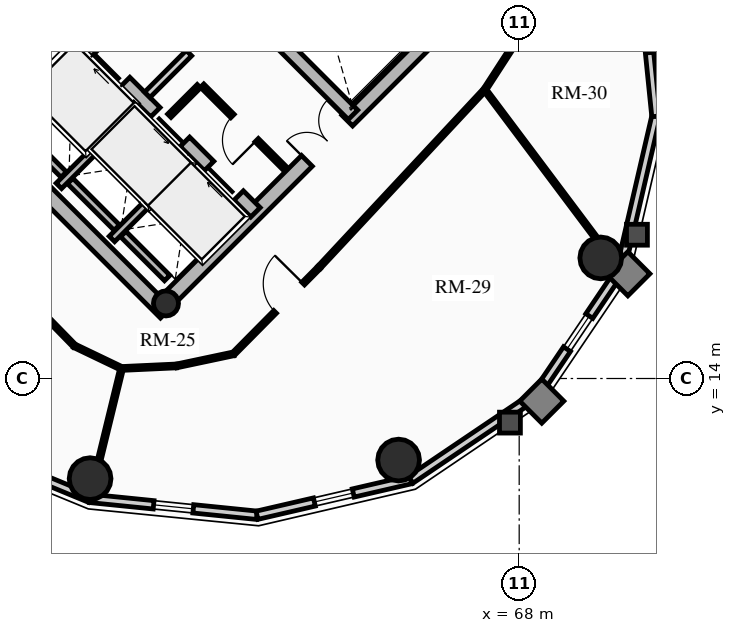
"""IFC4 building model, lengths in metres.
Left out: names, types, materials, properties, quantities, classifications, styles, units other than length and angle.
Written with IfcOpenShell. Run it as: python <this file> out.ifc"""

import sys

from ifc_helpers import new_model, si_unit, direction, frame, frame_2d, origin, origin_2d, place, context, subcontext, project, spatial, rectangle, circle, hollow_circle, extrude, source, transform, mapped, element, fill, save


model = new_model("IFC4")
c1 = context("Model", 3, precision=1e-05, world=origin(), true_north=direction((0.0, 1.0)))
c2 = subcontext(c1, "Body", "Model", "MODEL_VIEW")
j1 = project(units=[si_unit("LENGTHUNIT", "METRE"), si_unit("PLANEANGLEUNIT", "RADIAN")], contexts=[c1])
p1 = place(None, origin())
s1 = spatial("IfcSite", under=j1, at=p1, CompositionType="ELEMENT")
p2 = place(p1, origin())
s2 = spatial("IfcBuilding", under=s1, at=p2, CompositionType="ELEMENT")
p3 = place(p2, frame((0.0, 0.0, 202.48)))
s3 = spatial("IfcBuildingStorey", under=s2, at=p3, CompositionType="ELEMENT", Elevation=202.48)
p4 = place(p3, frame((58.702, 15.732, 0.0), z_axis=(0.0, 0.0, 1.0), x_axis=(-0.707106781187, 0.707106781187, 0.0)))
e1 = element("IfcWall", 1, at=p4, inside=s3, PredefinedType="SHEAR", context=c2, shape_type="SweptSolid", body=[
    extrude(rectangle(XDim=14.1, YDim=0.4, at=frame_2d((7.05, 0.0))), origin(), (0.0, 0.0, 1.0), 2.91),
])
p5 = place(p3, frame((58.561, 15.873, 0.0), z_axis=(0.0, 0.0, 1.0), x_axis=(0.707106781187, 0.707106781187, 0.0)))
e2 = element("IfcWall", 2, at=p5, inside=s3, PredefinedType="SHEAR", context=c2, shape_type="SweptSolid", body=[
    extrude(rectangle(XDim=10.7, YDim=0.4, at=frame_2d((5.35, 0.0))), origin(), (0.0, 0.0, 1.0), 2.91),
])
m1 = source(origin(), c2, "Body", "SweptSolid", [
    extrude(rectangle(XDim=1.5, YDim=2.02, at=frame_2d((0.75, 1.01))), frame((0.0, 0.21, 0.0), z_axis=(0.0, -1.0, 0.0), x_axis=(1.0, 0.0, 0.0)), (0.0, 0.0, 1.0), 0.42),
])
p6 = place(p5, frame((5.45, 0.0, 0.0)))
e3 = element("IfcOpeningElement", 3, at=p6, cuts=e2, PredefinedType="OPENING", context=c2, shape_type="MappedRepresentation", body=[
    mapped(m1, transform((0.0, 0.0, 0.0), x_axis=(1.0, 0.0, 0.0), y_axis=(0.0, 1.0, 0.0), z_axis=(0.0, 0.0, 1.0), scale=1.0)),
])
p7 = place(p3, frame((61.06, 18.373, 0.0), z_axis=(0.0, 0.0, 1.0), x_axis=(-0.707106781187, 0.707106781187, 0.0)))
e4 = element("IfcWall", 4, at=p7, inside=s3, PredefinedType="SHEAR", context=c2, shape_type="SweptSolid", body=[
    extrude(rectangle(XDim=13.7, YDim=0.35, at=frame_2d((6.85, 0.0))), origin(), (0.0, 0.0, 1.0), 2.91),
])
m2 = source(origin(), c2, "Body", "SweptSolid", [
    extrude(rectangle(XDim=1.1, YDim=2.015, at=frame_2d((0.55, 1.007))), frame((0.0, 0.185, 0.0), z_axis=(0.0, -1.0, 0.0), x_axis=(1.0, 0.0, 0.0)), (0.0, 0.0, 1.0), 0.37),
])
p8 = place(p7, frame((4.85, 0.0, 0.0)))
e5 = element("IfcOpeningElement", 5, at=p8, cuts=e4, PredefinedType="OPENING", context=c2, shape_type="MappedRepresentation", body=[
    mapped(m2, transform((0.0, 0.0, 0.0), x_axis=(1.0, 0.0, 0.0), y_axis=(0.0, 1.0, 0.0), z_axis=(0.0, 0.0, 1.0), scale=1.0)),
])
p9 = place(p7, frame((0.625, 0.0, 0.0)))
e6 = element("IfcOpeningElement", 6, at=p9, cuts=e4, PredefinedType="OPENING", context=c2, shape_type="MappedRepresentation", body=[
    mapped(m2, transform((0.0, 0.0, 0.0), x_axis=(1.0, 0.0, 0.0), y_axis=(0.0, 1.0, 0.0), z_axis=(0.0, 0.0, 1.0), scale=1.0)),
])
p10 = place(p7, frame((2.625, 0.0, 0.0)))
e7 = element("IfcOpeningElement", 7, at=p10, cuts=e4, PredefinedType="OPENING", context=c2, shape_type="MappedRepresentation", body=[
    mapped(m2, transform((0.0, 0.0, 0.0), x_axis=(1.0, 0.0, 0.0), y_axis=(0.0, 1.0, 0.0), z_axis=(0.0, 0.0, 1.0), scale=1.0)),
])
m3 = source(origin(), c2, "Body", "SweptSolid", [
    extrude(rectangle(XDim=1.15, YDim=2.02, at=frame_2d((0.575, 1.01))), frame((0.0, 0.185, 0.0), z_axis=(0.0, -1.0, 0.0), x_axis=(1.0, 0.0, 0.0)), (0.0, 0.0, 1.0), 0.37),
])
p11 = place(p7, frame((7.27, 0.0, 0.0)))
e8 = element("IfcOpeningElement", 8, at=p11, cuts=e4, PredefinedType="OPENING", context=c2, shape_type="MappedRepresentation", body=[
    mapped(m3, transform((0.0, 0.0, 0.0), x_axis=(1.0, 0.0, 0.0), y_axis=(0.0, 1.0, 0.0), z_axis=(0.0, 0.0, 1.0), scale=1.0)),
])
p12 = place(p3, frame((63.627, 20.94, 0.0), z_axis=(0.0, 0.0, 1.0), x_axis=(-0.707119496762, 0.707094065383, 0.0)))
e9 = element("IfcWall", 9, at=p12, inside=s3, PredefinedType="SHEAR", context=c2, shape_type="SweptSolid", body=[
    extrude(rectangle(XDim=9.6, YDim=0.35, at=frame_2d((4.8, 0.0))), origin(), (0.0, 0.0, 1.0), 2.91),
])
p13 = place(p12, frame((5.28, 0.0, 0.0)))
e10 = element("IfcOpeningElement", 10, at=p13, cuts=e9, PredefinedType="OPENING", context=c2, shape_type="MappedRepresentation", body=[
    mapped(m3, transform((0.0, 0.0, 0.0), x_axis=(1.0, 0.0, 0.0), y_axis=(0.0, 1.0, 0.0), z_axis=(0.0, 0.0, 1.0), scale=1.0)),
])
p14 = place(p3, frame((53.784, 21.003, 0.0), z_axis=(0.0, 0.0, 1.0), x_axis=(0.707106781187, 0.707106781187, 0.0)))
e11 = element("IfcWall", 11, at=p14, inside=s3, PredefinedType="SHEAR", context=c2, shape_type="SweptSolid", body=[
    extrude(rectangle(XDim=3.285, YDim=0.35, at=frame_2d((1.643, 0.0))), origin(), (0.0, 0.0, 1.0), 2.91),
])
p15 = place(p3, frame((58.706, 15.976, 0.0), z_axis=(0.0, 0.0, 1.0), x_axis=(0.707106781187, 0.707106781187, 0.0)))
e12 = element("IfcColumn", 12, at=p15, inside=s3, PredefinedType="COLUMN", context=c2, shape_type="SweptSolid", body=[
    extrude(hollow_circle(Radius=0.33, WallThickness=0.025, at=origin_2d()), origin(), (0.0, 0.0, 1.0), 2.91),
])
for number, where, z_axis, x_axis in (
    (13, (56.709, 11.365, 0.0), (0.0, 0.0, 1.0), (1.0, 0.0, 0.0)),
    (14, (64.827, 11.854, 0.0), (0.0, 0.0, 1.0), (1.0, 0.0, 0.0)),
    (15, (70.146, 17.173, 0.0), (0.0, 0.0, 1.0), (1.0, 0.0, 0.0)),
):
    element("IfcColumn", number, at=place(p3, frame(where, z_axis=z_axis, x_axis=x_axis)), inside=s3, PredefinedType="USERDEFINED", context=c2, shape_type="SweptSolid", body=[
        extrude(circle(Radius=0.55, at=origin_2d()), origin(), (0.0, 0.0, 1.0), 2.91),
    ])
p16 = place(p3, frame((56.705, 10.845, 0.0), z_axis=(0.0, 0.0, 1.0), x_axis=(-0.924447353237, 0.381309704956, 0.0)))
e16 = element("IfcWall", 16, at=p16, inside=s3, PredefinedType="SOLIDWALL", context=c2, shape_type="SweptSolid", body=[
    extrude(rectangle(XDim=4.671, YDim=0.22, at=frame_2d((2.335, 0.0))), origin(), (0.0, 0.0, 1.0), 2.322),
])
p17 = place(p3, frame((61.1, 10.401, 0.0), z_axis=(0.0, 0.0, 1.0), x_axis=(-0.994929930991, 0.100570534541, 0.0)))
e17 = element("IfcWall", 17, at=p17, inside=s3, PredefinedType="SOLIDWALL", context=c2, shape_type="SweptSolid", body=[
    extrude(rectangle(XDim=4.418, YDim=0.22, at=frame_2d((2.209, 0.0))), origin(), (0.0, 0.0, 1.0), 2.322),
])
m4 = source(origin(), c2, "Body", "SweptSolid", [
    extrude(rectangle(XDim=1.05, YDim=1.3, at=frame_2d((0.525, 0.65))), frame((0.0, 0.12, 0.0), z_axis=(0.0, -1.0, 0.0), x_axis=(1.0, 0.0, 0.0)), (0.0, 0.0, 1.0), 0.24),
])
p18 = place(p17, frame((1.684, 0.0, 0.65)))
e18 = element("IfcOpeningElement", 18, at=p18, cuts=e17, PredefinedType="OPENING", context=c2, shape_type="MappedRepresentation", body=[
    mapped(m4, transform((0.0, 0.0, 0.0), x_axis=(1.0, 0.0, 0.0), y_axis=(0.0, 1.0, 0.0), z_axis=(0.0, 0.0, 1.0), scale=1.0)),
])
p19 = place(p3, frame((65.144, 11.337, 0.0), z_axis=(0.0, 0.0, 1.0), x_axis=(-0.974249228678, -0.225473813158, 0.0)))
e19 = element("IfcWall", 19, at=p19, inside=s3, PredefinedType="SOLIDWALL", context=c2, shape_type="SweptSolid", body=[
    extrude(rectangle(XDim=4.15, YDim=0.22, at=frame_2d((2.075, 0.0))), origin(), (0.0, 0.0, 1.0), 2.322),
])
p20 = place(p19, frame((1.55, 0.0, 0.65)))
e20 = element("IfcOpeningElement", 20, at=p20, cuts=e19, PredefinedType="OPENING", context=c2, shape_type="MappedRepresentation", body=[
    mapped(m4, transform((0.0, 0.0, 0.0), x_axis=(1.0, 0.0, 0.0), y_axis=(0.0, 1.0, 0.0), z_axis=(0.0, 0.0, 1.0), scale=1.0)),
])
p21 = place(p3, frame((68.439, 13.561, 0.0), z_axis=(0.0, 0.0, 1.0), x_axis=(-0.828833723692, -0.559495003079, 0.0)))
e21 = element("IfcWall", 21, at=p21, inside=s3, PredefinedType="SOLIDWALL", context=c2, shape_type="SweptSolid", body=[
    extrude(rectangle(XDim=3.976, YDim=0.22, at=frame_2d((1.988, 0.0))), origin(), (0.0, 0.0, 1.0), 2.322),
])
p22 = place(p3, frame((70.663, 16.856, 0.0), z_axis=(0.0, 0.0, 1.0), x_axis=(-0.559495003079, -0.828833723692, 0.0)))
e22 = element("IfcWall", 22, at=p22, inside=s3, PredefinedType="SOLIDWALL", context=c2, shape_type="SweptSolid", body=[
    extrude(rectangle(XDim=3.976, YDim=0.22, at=frame_2d((1.988, 0.0))), origin(), (0.0, 0.0, 1.0), 2.322),
])
p23 = place(p22, frame((1.463, 0.0, 0.65)))
e23 = element("IfcOpeningElement", 23, at=p23, cuts=e22, PredefinedType="OPENING", context=c2, shape_type="MappedRepresentation", body=[
    mapped(m4, transform((0.0, 0.0, 0.0), x_axis=(1.0, 0.0, 0.0), y_axis=(0.0, 1.0, 0.0), z_axis=(0.0, 0.0, 1.0), scale=1.0)),
])
p24 = place(p3, frame((71.599, 20.9, 0.0), z_axis=(0.0, 0.0, 1.0), x_axis=(-0.225473813158, -0.974249228678, 0.0)))
e24 = element("IfcWall", 24, at=p24, inside=s3, PredefinedType="SOLIDWALL", context=c2, shape_type="SweptSolid", body=[
    extrude(rectangle(XDim=4.15, YDim=0.22, at=frame_2d((2.075, 0.0))), origin(), (0.0, 0.0, 1.0), 2.322),
])
p25 = place(p3, frame((71.155, 25.295, 0.0), z_axis=(0.0, 0.0, 1.0), x_axis=(0.100570534541, -0.994929930991, 0.0)))
e25 = element("IfcWall", 25, at=p25, inside=s3, PredefinedType="SOLIDWALL", context=c2, shape_type="SweptSolid", body=[
    extrude(rectangle(XDim=4.418, YDim=0.22, at=frame_2d((2.209, 0.0))), origin(), (0.0, 0.0, 1.0), 2.322),
])
p26 = place(p25, frame((1.684, 0.0, 0.65)))
e26 = element("IfcOpeningElement", 26, at=p26, cuts=e25, PredefinedType="OPENING", context=c2, shape_type="MappedRepresentation", body=[
    mapped(m4, transform((0.0, 0.0, 0.0), x_axis=(1.0, 0.0, 0.0), y_axis=(0.0, 1.0, 0.0), z_axis=(0.0, 0.0, 1.0), scale=1.0)),
])
p27 = place(p3, frame((55.888, 19.069, 0.0), z_axis=(0.0, 0.0, 1.0), x_axis=(0.707106781187, 0.707106781187, 0.0)))
e27 = element("IfcWall", 27, at=p27, inside=s3, PredefinedType="SHEAR", context=c2, shape_type="SweptSolid", body=[
    extrude(rectangle(XDim=2.97, YDim=0.2, at=frame_2d((1.485, 0.0))), origin(), (0.0, 0.0, 1.0), 2.91),
])
p28 = place(p3, frame((56.015, 19.366, 0.0), z_axis=(0.0, 0.0, 1.0), x_axis=(-0.707106781187, 0.707106781187, 0.0)))
e28 = element("IfcWall", 28, at=p28, inside=s3, PredefinedType="SHEAR", context=c2, shape_type="SweptSolid", body=[
    extrude(rectangle(XDim=2.44, YDim=0.2, at=frame_2d((1.22, 0.0))), origin(), (0.0, 0.0, 1.0), 2.91),
])
p29 = place(p3, frame((57.284, 17.673, 0.0), z_axis=(0.0, 0.0, 1.0), x_axis=(0.707147878904, 0.70706568108, 0.0)))
e29 = element("IfcWall", 29, at=p29, inside=s3, PredefinedType="SHEAR", context=c2, shape_type="SweptSolid", body=[
    extrude(rectangle(XDim=2.97, YDim=0.2, at=frame_2d((1.485, 0.0))), origin(), (0.0, 0.0, 1.0), 2.91),
])
p30 = place(p3, frame((57.412, 17.97, 0.0), z_axis=(0.0, 0.0, 1.0), x_axis=(-0.707106781187, 0.707106781187, 0.0)))
e30 = element("IfcWall", 30, at=p30, inside=s3, PredefinedType="SHEAR", context=c2, shape_type="SweptSolid", body=[
    extrude(rectangle(XDim=1.735, YDim=0.2, at=frame_2d((0.867, 0.0))), origin(), (0.0, 0.0, 1.0), 2.91),
])
p31 = place(p3, frame((58.737, 16.644, 0.0), z_axis=(0.0, 0.0, 1.0), x_axis=(-0.707032117043, 0.707181437447, 0.0)))
e31 = element("IfcWall", 31, at=p31, inside=s3, PredefinedType="SHEAR", context=c2, shape_type="SweptSolid", body=[
    extrude(rectangle(XDim=1.635, YDim=0.2, at=frame_2d((0.817, 0.0))), origin(), (0.0, 0.0, 1.0), 2.91),
])
p32 = place(p3, frame((58.214, 21.467, 0.0), z_axis=(0.0, 0.0, 1.0), x_axis=(0.707106781187, 0.707106781187, 0.0)))
e32 = element("IfcWall", 32, at=p32, inside=s3, PredefinedType="PARTITIONING", context=c2, shape_type="SweptSolid", body=[
    extrude(rectangle(XDim=3.28, YDim=0.2, at=frame_2d((1.64, 0.0))), origin(), (0.0, 0.0, 1.0), 2.685),
])
m5 = source(origin(), c2, "Body", "SweptSolid", [
    extrude(rectangle(XDim=1.5, YDim=2.02, at=frame_2d((0.75, 1.01))), frame((0.0, 0.11, 0.0), z_axis=(0.0, -1.0, 0.0), x_axis=(1.0, 0.0, 0.0)), (0.0, 0.0, 1.0), 0.22),
])
p33 = place(p32, frame((1.55, 0.0, 0.0)))
e33 = element("IfcOpeningElement", 33, at=p33, cuts=e32, PredefinedType="OPENING", context=c2, shape_type="MappedRepresentation", body=[
    mapped(m5, transform((0.0, 0.0, 0.0), x_axis=(1.0, 0.0, 0.0), y_axis=(0.0, 1.0, 0.0), z_axis=(0.0, 0.0, 1.0), scale=1.0)),
])
p34 = place(p3, frame((61.835, 19.529, 0.0), z_axis=(0.0, 0.0, 1.0), x_axis=(-0.707146413884, 0.707067146267, 0.0)))
e34 = element("IfcWall", 34, at=p34, inside=s3, PredefinedType="PARTITIONING", context=c2, shape_type="SweptSolid", body=[
    extrude(rectangle(XDim=3.08, YDim=0.125, at=frame_2d((1.54, 0.0))), origin(), (0.0, 0.0, 1.0), 2.685),
])
m6 = source(origin(), c2, "Body", "SweptSolid", [
    extrude(rectangle(XDim=0.9, YDim=2.005, at=frame_2d((0.45, 1.002))), frame((0.0, 0.073, 0.0), z_axis=(0.0, -1.0, 0.0), x_axis=(1.0, 0.0, 0.0)), (0.0, 0.0, 1.0), 0.145),
])
p35 = place(p34, frame((1.05, 0.0, 0.0)))
e35 = element("IfcOpeningElement", 35, at=p35, cuts=e34, PredefinedType="OPENING", context=c2, shape_type="MappedRepresentation", body=[
    mapped(m6, transform((0.0, 0.0, 0.0), x_axis=(1.0, 0.0, 0.0), y_axis=(0.0, 1.0, 0.0), z_axis=(0.0, 0.0, 1.0), scale=1.0)),
])
p36 = place(p3, frame((58.794, 20.915, 0.0), z_axis=(0.0, 0.0, 1.0), x_axis=(0.707106781187, 0.707106781187, 0.0)))
e36 = element("IfcWall", 36, at=p36, inside=s3, PredefinedType="PARTITIONING", context=c2, shape_type="SweptSolid", body=[
    extrude(rectangle(XDim=1.1, YDim=0.125, at=frame_2d((0.55, 0.0))), origin(), (0.0, 0.0, 1.0), 2.685),
])
p37 = place(p3, frame((52.126, 19.126, 0.0), z_axis=(0.0, 0.0, 1.0), x_axis=(0.698979087027, -0.715142108884, 0.0)))
e37 = element("IfcWall", 37, at=p37, inside=s3, PredefinedType="MOVABLE", context=c2, shape_type="SweptSolid", body=[
    extrude(rectangle(XDim=5.966, YDim=0.1, at=frame_2d((2.983, 0.0))), origin(), (0.0, 0.0, 1.0), 2.322),
])
p38 = place(p3, frame((56.296, 14.859, 0.0), z_axis=(0.0, 0.0, 1.0), x_axis=(0.90178292445, -0.432189260823, 0.0)))
e38 = element("IfcWall", 38, at=p38, inside=s3, PredefinedType="MOVABLE", context=c2, shape_type="SweptSolid", body=[
    extrude(rectangle(XDim=1.377, YDim=0.1, at=frame_2d((0.688, 0.0))), origin(), (0.0, 0.0, 1.0), 2.255),
])
p39 = place(p3, frame((57.538, 14.264, 0.0), z_axis=(0.0, 0.0, 1.0), x_axis=(0.99892990172, 0.046249880546, 0.0)))
e39 = element("IfcWall", 39, at=p39, inside=s3, PredefinedType="MOVABLE", context=c2, shape_type="SweptSolid", body=[
    extrude(rectangle(XDim=1.446, YDim=0.1, at=frame_2d((0.723, 0.0))), origin(), (0.0, 0.0, 1.0), 2.322),
])
p40 = place(p3, frame((58.983, 14.331, 0.0), z_axis=(0.0, 0.0, 1.0), x_axis=(0.978328007546, 0.207061125397, 0.0)))
e40 = element("IfcWall", 40, at=p40, inside=s3, PredefinedType="MOVABLE", context=c2, shape_type="SweptSolid", body=[
    extrude(rectangle(XDim=1.534, YDim=0.1, at=frame_2d((0.767, 0.0))), origin(), (0.0, 0.0, 1.0), 2.255),
])
p41 = place(p3, frame((60.484, 14.648, 0.0), z_axis=(0.0, 0.0, 1.0), x_axis=(0.703398221944, 0.710795991383, 0.0)))
e41 = element("IfcWall", 41, at=p41, inside=s3, PredefinedType="MOVABLE", context=c2, shape_type="SweptSolid", body=[
    extrude(rectangle(XDim=3.201, YDim=0.1, at=frame_2d((1.601, 0.0))), origin(), (0.0, 0.0, 1.0), 2.322),
])
m7 = source(origin(), c2, "Body", "SweptSolid", [
    extrude(rectangle(XDim=1.05, YDim=2.015, at=frame_2d((0.525, 1.007))), frame((0.0, 0.06, 0.0), z_axis=(0.0, -1.0, 0.0), x_axis=(1.0, 0.0, 0.0)), (0.0, 0.0, 1.0), 0.12),
])
p42 = place(p41, frame((1.553, 0.0, 0.0)))
e42 = element("IfcOpeningElement", 42, at=p42, cuts=e41, PredefinedType="OPENING", context=c2, shape_type="MappedRepresentation", body=[
    mapped(m7, transform((0.0, 0.0, 0.0), x_axis=(1.0, 0.0, 0.0), y_axis=(0.0, 1.0, 0.0), z_axis=(0.0, 0.0, 1.0), scale=1.0)),
])
p43 = place(p3, frame((62.736, 16.924, 0.0), z_axis=(0.0, 0.0, 1.0), x_axis=(0.681946700833, 0.731401871219, 0.0)))
e43 = element("IfcWall", 43, at=p43, inside=s3, PredefinedType="MOVABLE", context=c2, shape_type="SweptSolid", body=[
    extrude(rectangle(XDim=6.393, YDim=0.1, at=frame_2d((3.196, 0.0))), origin(), (0.0, 0.0, 1.0), 2.255),
])
p44 = place(p3, frame((67.095, 21.6, 0.0), z_axis=(0.0, 0.0, 1.0), x_axis=(0.543773190184, 0.839232219137, 0.0)))
e44 = element("IfcWall", 44, at=p44, inside=s3, PredefinedType="MOVABLE", context=c2, shape_type="SweptSolid", body=[
    extrude(rectangle(XDim=1.823, YDim=0.1, at=frame_2d((0.911, 0.0))), origin(), (0.0, 0.0, 1.0), 2.255),
])
p45 = place(p3, frame((57.538, 14.264, 0.0), z_axis=(0.0, 0.0, 1.0), x_axis=(-0.237377006249, -0.971417601706, 0.0)))
e45 = element("IfcWall", 45, at=p45, inside=s3, PredefinedType="MOVABLE", context=c2, shape_type="SweptSolid", body=[
    extrude(rectangle(XDim=3.499, YDim=0.1, at=frame_2d((1.75, 0.0))), origin(), (0.0, 0.0, 1.0), 2.322),
])
p46 = place(p3, frame((67.095, 21.6, 0.0), z_axis=(0.0, 0.0, 1.0), x_axis=(0.599947190798, -0.800039604178, 0.0)))
e46 = element("IfcWall", 46, at=p46, inside=s3, PredefinedType="MOVABLE", context=c2, shape_type="SweptSolid", body=[
    extrude(rectangle(XDim=5.918, YDim=0.1, at=frame_2d((2.959, 0.0))), origin(), (0.0, 0.0, 1.0), 2.322),
])
m8 = source(origin(), c2, "Body", "SweptSolid", [
    extrude(rectangle(XDim=1.05, YDim=1.3, at=frame_2d((0.525, 0.65))), frame((0.0, 0.03, 0.0), z_axis=(0.0, -1.0, 0.0), x_axis=(1.0, 0.0, 0.0)), (0.0, 0.0, 1.0), 0.06),
])
p47 = place(p18, origin())
e47 = element("IfcWindow", 47, at=p47, inside=s3, PartitioningType="SINGLE_PANEL", PredefinedType="WINDOW", context=c2, shape_type="MappedRepresentation", body=[
    mapped(m8, transform((0.0, 0.0, 0.0), x_axis=(1.0, 0.0, 0.0), y_axis=(0.0, 1.0, 0.0), z_axis=(0.0, 0.0, 1.0), scale=1.0)),
])
fill(e18, e47)
p48 = place(p20, origin())
e48 = element("IfcWindow", 48, at=p48, inside=s3, PartitioningType="SINGLE_PANEL", PredefinedType="WINDOW", context=c2, shape_type="MappedRepresentation", body=[
    mapped(m8, transform((0.0, 0.0, 0.0), x_axis=(1.0, 0.0, 0.0), y_axis=(0.0, 1.0, 0.0), z_axis=(0.0, 0.0, 1.0), scale=1.0)),
])
fill(e20, e48)
p49 = place(p23, origin())
e49 = element("IfcWindow", 49, at=p49, inside=s3, PartitioningType="SINGLE_PANEL", PredefinedType="WINDOW", context=c2, shape_type="MappedRepresentation", body=[
    mapped(m8, transform((0.0, 0.0, 0.0), x_axis=(1.0, 0.0, 0.0), y_axis=(0.0, 1.0, 0.0), z_axis=(0.0, 0.0, 1.0), scale=1.0)),
])
fill(e23, e49)
p50 = place(p26, origin())
e50 = element("IfcWindow", 50, at=p50, inside=s3, PartitioningType="SINGLE_PANEL", PredefinedType="WINDOW", context=c2, shape_type="MappedRepresentation", body=[
    mapped(m8, transform((0.0, 0.0, 0.0), x_axis=(1.0, 0.0, 0.0), y_axis=(0.0, 1.0, 0.0), z_axis=(0.0, 0.0, 1.0), scale=1.0)),
])
fill(e26, e50)
m9 = source(origin(), c2, "Body", "SweptSolid", [
    extrude(rectangle(XDim=1.1, YDim=2.015, at=frame_2d((0.55, 1.007))), frame((0.0, 0.025, 0.0), z_axis=(0.0, -1.0, 0.0), x_axis=(1.0, 0.0, 0.0)), (0.0, 0.0, 1.0), 0.05),
])
p51 = place(p8, origin())
e51 = element("IfcDoor", 51, at=p51, inside=s3, OperationType="SLIDING_TO_RIGHT", PredefinedType="DOOR", context=c2, shape_type="MappedRepresentation", body=[
    mapped(m9, transform((0.0, 0.0, 0.0), x_axis=(1.0, 0.0, 0.0), y_axis=(0.0, 1.0, 0.0), z_axis=(0.0, 0.0, 1.0), scale=1.0)),
])
fill(e5, e51)
p52 = place(p9, origin())
e52 = element("IfcDoor", 52, at=p52, inside=s3, OperationType="SLIDING_TO_RIGHT", PredefinedType="DOOR", context=c2, shape_type="MappedRepresentation", body=[
    mapped(m9, transform((0.0, 0.0, 0.0), x_axis=(1.0, 0.0, 0.0), y_axis=(0.0, 1.0, 0.0), z_axis=(0.0, 0.0, 1.0), scale=1.0)),
])
fill(e6, e52)
p53 = place(p10, origin())
e53 = element("IfcDoor", 53, at=p53, inside=s3, OperationType="SLIDING_TO_LEFT", PredefinedType="DOOR", context=c2, shape_type="MappedRepresentation", body=[
    mapped(m9, transform((0.0, 0.0, 0.0), x_axis=(1.0, 0.0, 0.0), y_axis=(0.0, 1.0, 0.0), z_axis=(0.0, 0.0, 1.0), scale=1.0)),
])
fill(e7, e53)
m10 = source(origin(), c2, "Body", "SweptSolid", [
    extrude(rectangle(XDim=1.5, YDim=2.02, at=frame_2d((0.75, 1.01))), frame((0.0, 0.025, 0.0), z_axis=(0.0, -1.0, 0.0), x_axis=(1.0, 0.0, 0.0)), (0.0, 0.0, 1.0), 0.05),
])
p54 = place(p6, origin())
e54 = element("IfcDoor", 54, at=p54, inside=s3, OperationType="DOUBLE_DOOR_SINGLE_SWING", PredefinedType="DOOR", context=c2, shape_type="MappedRepresentation", body=[
    mapped(m10, transform((0.0, 0.0, 0.0), x_axis=(1.0, 0.0, 0.0), y_axis=(0.0, 1.0, 0.0), z_axis=(0.0, 0.0, 1.0), scale=1.0)),
])
fill(e3, e54)
p55 = place(p33, origin())
e55 = element("IfcDoor", 55, at=p55, inside=s3, OperationType="DOUBLE_DOOR_SINGLE_SWING", PredefinedType="DOOR", context=c2, shape_type="MappedRepresentation", body=[
    mapped(m10, transform((0.0, 0.0, 0.0), x_axis=(1.0, 0.0, 0.0), y_axis=(0.0, 1.0, 0.0), z_axis=(0.0, 0.0, 1.0), scale=1.0)),
])
fill(e33, e55)
m11 = source(origin(), c2, "Body", "SweptSolid", [
    extrude(rectangle(XDim=0.9, YDim=2.005, at=frame_2d((0.45, 1.002))), frame((0.0, 0.025, 0.0), z_axis=(0.0, -1.0, 0.0), x_axis=(1.0, 0.0, 0.0)), (0.0, 0.0, 1.0), 0.05),
])
p56 = place(p35, origin())
e56 = element("IfcDoor", 56, at=p56, inside=s3, OperationType="SINGLE_SWING_LEFT", PredefinedType="DOOR", context=c2, shape_type="MappedRepresentation", body=[
    mapped(m11, transform((0.0, 0.0, 0.0), x_axis=(1.0, 0.0, 0.0), y_axis=(0.0, 1.0, 0.0), z_axis=(0.0, 0.0, 1.0), scale=1.0)),
])
fill(e35, e56)
m12 = source(origin(), c2, "Body", "SweptSolid", [
    extrude(rectangle(XDim=1.05, YDim=2.015, at=frame_2d((0.525, 1.007))), frame((0.0, 0.025, 0.0), z_axis=(0.0, -1.0, 0.0), x_axis=(1.0, 0.0, 0.0)), (0.0, 0.0, 1.0), 0.05),
])
p57 = place(p42, origin())
e57 = element("IfcDoor", 57, at=p57, inside=s3, OperationType="SINGLE_SWING_RIGHT", PredefinedType="DOOR", context=c2, shape_type="MappedRepresentation", body=[
    mapped(m12, transform((0.0, 0.0, 0.0), x_axis=(1.0, 0.0, 0.0), y_axis=(0.0, 1.0, 0.0), z_axis=(0.0, 0.0, 1.0), scale=1.0)),
])
fill(e42, e57)
save(model, sys.argv[1])
